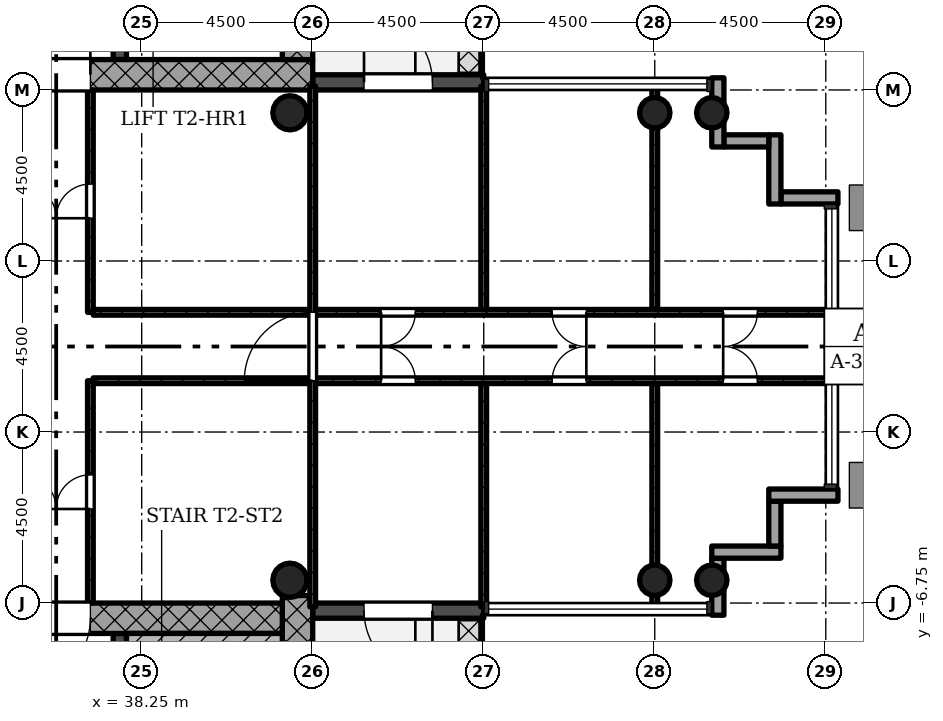
"""IFC4 building model, lengths in metres.
Left out: names, types, materials, properties, quantities, classifications, styles, units other than length and angle.
Written with IfcOpenShell. Run it as: python <this file> out.ifc"""

import sys

from ifc_helpers import new_model, si_unit, direction, frame, frame_2d, origin, origin_2d, place, context, subcontext, project, spatial, rectangle, hollow_circle, extrude, element, fill, save


model = new_model("IFC4")
c1 = context("Model", 3, precision=1e-05, world=origin(), true_north=direction((0.0, 1.0)))
c2 = subcontext(c1, "Body", "Model", "MODEL_VIEW")
j1 = project(units=[si_unit("LENGTHUNIT", "METRE"), si_unit("PLANEANGLEUNIT", "RADIAN")], contexts=[c1])
p1 = place(None, origin())
s1 = spatial("IfcSite", under=j1, at=p1, CompositionType="ELEMENT")
p2 = place(p1, origin())
s2 = spatial("IfcBuilding", under=s1, at=p2, CompositionType="ELEMENT")
p3 = place(p2, frame((0.0, 0.0, 128.7)))
s3 = spatial("IfcBuildingStorey", under=s2, at=p3, CompositionType="ELEMENT", Elevation=128.7)
p4 = place(p3, frame((30.05, 7.15, 0.0), z_axis=(0.0, 0.0, 1.0), x_axis=(1.0, 0.0, 0.0)))
e1 = element("IfcWall", 1, at=p4, inside=s3, PredefinedType="SHEAR", context=c2, shape_type="SweptSolid", body=[
    extrude(rectangle(XDim=12.7, YDim=0.8, at=frame_2d((6.35, 0.0))), origin(), (0.0, 0.0, 1.0), 5.0),
])
p5 = place(p4, frame((5.05, 0.0, 0.0)))
e2 = element("IfcOpeningElement", 2, at=p5, cuts=e1, PredefinedType="OPENING", context=c2, shape_type="SweptSolid", body=[
    extrude(rectangle(XDim=1.8, YDim=2.1, at=frame_2d((0.9, 1.05))), frame((0.0, 0.41, 0.0), z_axis=(0.0, -1.0, 0.0), x_axis=(1.0, 0.0, 0.0)), (0.0, 0.0, 1.0), 0.82),
])
p6 = place(p3, frame((42.35, 7.55, 0.0), z_axis=(0.0, 0.0, 1.0), x_axis=(0.0, 1.0, 0.0)))
e3 = element("IfcWall", 3, at=p6, inside=s3, PredefinedType="SHEAR", context=c2, shape_type="SweptSolid", body=[
    extrude(rectangle(XDim=8.2, YDim=0.8, at=frame_2d((4.1, 0.0))), origin(), (0.0, 0.0, 1.0), 5.0),
])
p7 = place(p3, frame((37.675, 7.55, 0.0), z_axis=(0.0, 0.0, 1.0), x_axis=(0.0, 1.0, 0.0)))
e4 = element("IfcWall", 4, at=p7, inside=s3, PredefinedType="SHEAR", context=c2, shape_type="SweptSolid", body=[
    extrude(rectangle(XDim=7.4, YDim=0.35, at=frame_2d((3.7, 0.0))), origin(), (0.0, 0.0, 1.0), 5.0),
])
p8 = place(p7, frame((0.95, 0.0, 0.0)))
e5 = element("IfcOpeningElement", 5, at=p8, cuts=e4, PredefinedType="OPENING", context=c2, shape_type="SweptSolid", body=[
    extrude(rectangle(XDim=1.1, YDim=2.1, at=frame_2d((0.55, 1.05))), frame((0.0, 0.185, 0.0), z_axis=(0.0, -1.0, 0.0), x_axis=(1.0, 0.0, 0.0)), (0.0, 0.0, 1.0), 0.37),
])
p9 = place(p7, frame((3.15, 0.0, 0.0)))
e6 = element("IfcOpeningElement", 6, at=p9, cuts=e4, PredefinedType="OPENING", context=c2, shape_type="SweptSolid", body=[
    extrude(rectangle(XDim=1.1, YDim=2.1, at=frame_2d((0.55, 1.05))), frame((0.0, 0.185, 0.0), z_axis=(0.0, -1.0, 0.0), x_axis=(1.0, 0.0, 0.0)), (0.0, 0.0, 1.0), 0.37),
])
p10 = place(p7, frame((5.35, 0.0, 0.0)))
e7 = element("IfcOpeningElement", 7, at=p10, cuts=e4, PredefinedType="OPENING", context=c2, shape_type="SweptSolid", body=[
    extrude(rectangle(XDim=1.1, YDim=2.1, at=frame_2d((0.55, 1.05))), frame((0.0, 0.185, 0.0), z_axis=(0.0, -1.0, 0.0), x_axis=(1.0, 0.0, 0.0)), (0.0, 0.0, 1.0), 0.37),
])
p11 = place(p3, frame((42.35, -14.95, 0.0), z_axis=(0.0, 0.0, 1.0), x_axis=(0.0, 1.0, 0.0)))
e8 = element("IfcWall", 8, at=p11, inside=s3, PredefinedType="SHEAR", context=c2, shape_type="SweptSolid", body=[
    extrude(rectangle(XDim=8.398, YDim=0.8, at=frame_2d((4.199, 0.0))), origin(), (0.0, 0.0, 1.0), 5.0),
])
p12 = place(p3, frame((41.95, -7.15, 0.0), z_axis=(0.0, 0.0, 1.0), x_axis=(-1.0, 0.0, 0.0)))
e9 = element("IfcWall", 9, at=p12, inside=s3, PredefinedType="SHEAR", context=c2, shape_type="SweptSolid", body=[
    extrude(rectangle(XDim=12.7, YDim=0.8, at=frame_2d((6.35, 0.0))), origin(), (0.0, 0.0, 1.0), 5.0),
])
p13 = place(p12, frame((5.05, 0.0, 0.0)))
e10 = element("IfcOpeningElement", 10, at=p13, cuts=e9, PredefinedType="OPENING", context=c2, shape_type="SweptSolid", body=[
    extrude(rectangle(XDim=1.8, YDim=2.1, at=frame_2d((0.9, 1.05))), frame((0.0, 0.41, 0.0), z_axis=(0.0, -1.0, 0.0), x_axis=(1.0, 0.0, 0.0)), (0.0, 0.0, 1.0), 0.82),
])
p14 = place(p3, frame((37.675, -14.95, 0.0), z_axis=(0.0, 0.0, 1.0), x_axis=(0.0, 1.0, 0.0)))
e11 = element("IfcWall", 11, at=p14, inside=s3, PredefinedType="SHEAR", context=c2, shape_type="SweptSolid", body=[
    extrude(rectangle(XDim=7.4, YDim=0.35, at=frame_2d((3.7, 0.0))), origin(), (0.0, 0.0, 1.0), 5.0),
])
p15 = place(p14, frame((5.65, 0.0, 0.0)))
e12 = element("IfcOpeningElement", 12, at=p15, cuts=e11, PredefinedType="OPENING", context=c2, shape_type="SweptSolid", body=[
    extrude(rectangle(XDim=0.9, YDim=2.1, at=frame_2d((0.45, 1.05))), frame((0.0, 0.185, 0.0), z_axis=(0.0, -1.0, 0.0), x_axis=(1.0, 0.0, 0.0)), (0.0, 0.0, 1.0), 0.37),
])
for number, where, z_axis, x_axis in (
    (13, (51.75, -6.15, 0.0), (0.0, 0.0, 1.0), (1.0, 0.0, 0.0)),
    (14, (51.75, 6.15, 0.0), (0.0, 0.0, 1.0), (1.0, 0.0, 0.0)),
    (15, (53.25, -6.15, 0.0), (0.0, 0.0, 1.0), (1.0, 0.0, 0.0)),
    (16, (53.25, 6.15, 0.0), (0.0, 0.0, 1.0), (1.0, 0.0, 0.0)),
):
    element("IfcColumn", number, at=place(p3, frame(where, z_axis=z_axis, x_axis=x_axis)), inside=s3, PredefinedType="COLUMN", context=c2, shape_type="SweptSolid", body=[
        extrude(hollow_circle(Radius=0.4, WallThickness=0.028, at=origin_2d()), origin(), (0.0, 0.0, 1.0), 5.0),
    ])
for number, where, z_axis, x_axis in (
    (17, (42.15, -6.15, 0.0), (0.0, 0.0, 1.0), (1.0, 0.0, 0.0)),
    (18, (42.15, 6.15, 0.0), (0.0, 0.0, 1.0), (1.0, 0.0, 0.0)),
):
    element("IfcColumn", number, at=place(p3, frame(where, z_axis=z_axis, x_axis=x_axis)), inside=s3, PredefinedType="COLUMN", context=c2, shape_type="SweptSolid", body=[
        extrude(hollow_circle(Radius=0.45, WallThickness=0.032, at=origin_2d()), origin(), (0.0, 0.0, 1.0), 5.0),
    ])
p16 = place(p3, frame((42.75, -6.95, -0.02), z_axis=(0.0, 0.0, 1.0), x_axis=(1.0, 0.0, 0.0)))
e19 = element("IfcWall", 19, at=p16, inside=s3, PredefinedType="STANDARD", context=c2, shape_type="SweptSolid", body=[
    extrude(rectangle(XDim=4.5, YDim=0.4, at=frame_2d((2.25, 0.0))), origin(), (0.0, 0.0, 1.0), 4.72),
])
p17 = place(p16, frame((1.35, 0.0, 0.02)))
e20 = element("IfcOpeningElement", 20, at=p17, cuts=e19, PredefinedType="OPENING", context=c2, shape_type="SweptSolid", body=[
    extrude(rectangle(XDim=1.8, YDim=2.1, at=frame_2d((0.9, 1.05))), frame((0.0, 0.21, 0.0), z_axis=(0.0, -1.0, 0.0), x_axis=(1.0, 0.0, 0.0)), (0.0, 0.0, 1.0), 0.42),
])
p18 = place(p3, frame((53.41, -7.07, -0.3), z_axis=(0.0, 0.0, 1.0), x_axis=(0.0, 1.0, 0.0)))
e21 = element("IfcWall", 21, at=p18, inside=s3, PredefinedType="STANDARD", context=c2, shape_type="SweptSolid", body=[
    extrude(rectangle(XDim=1.5, YDim=0.32, at=frame_2d((0.75, 0.0))), origin(), (0.0, 0.0, 1.0), 5.0),
])
p19 = place(p3, frame((53.25, -5.41, -0.3), z_axis=(0.0, 0.0, 1.0), x_axis=(1.0, 0.0, 0.0)))
e22 = element("IfcWall", 22, at=p19, inside=s3, PredefinedType="STANDARD", context=c2, shape_type="SweptSolid", body=[
    extrude(rectangle(XDim=1.82, YDim=0.32, at=frame_2d((0.91, 0.0))), origin(), (0.0, 0.0, 1.0), 5.0),
])
p20 = place(p3, frame((54.91, -5.25, -0.3), z_axis=(0.0, 0.0, 1.0), x_axis=(0.0, 1.0, 0.0)))
e23 = element("IfcWall", 23, at=p20, inside=s3, PredefinedType="STANDARD", context=c2, shape_type="SweptSolid", body=[
    extrude(rectangle(XDim=1.18, YDim=0.32, at=frame_2d((0.59, 0.0))), origin(), (0.0, 0.0, 1.0), 5.0),
])
p21 = place(p3, frame((54.75, -3.91, -0.3), z_axis=(0.0, 0.0, 1.0), x_axis=(1.0, 0.0, 0.0)))
e24 = element("IfcWall", 24, at=p21, inside=s3, PredefinedType="STANDARD", context=c2, shape_type="SweptSolid", body=[
    extrude(rectangle(XDim=1.82, YDim=0.32, at=frame_2d((0.91, 0.0))), origin(), (0.0, 0.0, 1.0), 5.0),
])
p22 = place(p3, frame((56.57, 3.91, -0.3), z_axis=(0.0, 0.0, 1.0), x_axis=(-1.0, 0.0, 0.0)))
e25 = element("IfcWall", 25, at=p22, inside=s3, PredefinedType="STANDARD", context=c2, shape_type="SweptSolid", body=[
    extrude(rectangle(XDim=1.5, YDim=0.32, at=frame_2d((0.75, 0.0))), origin(), (0.0, 0.0, 1.0), 5.0),
])
p23 = place(p3, frame((54.91, 3.75, -0.3), z_axis=(0.0, 0.0, 1.0), x_axis=(0.0, 1.0, 0.0)))
e26 = element("IfcWall", 26, at=p23, inside=s3, PredefinedType="STANDARD", context=c2, shape_type="SweptSolid", body=[
    extrude(rectangle(XDim=1.82, YDim=0.32, at=frame_2d((0.91, 0.0))), origin(), (0.0, 0.0, 1.0), 5.0),
])
p24 = place(p3, frame((54.75, 5.41, -0.3), z_axis=(0.0, 0.0, 1.0), x_axis=(-1.0, 0.0, 0.0)))
e27 = element("IfcWall", 27, at=p24, inside=s3, PredefinedType="STANDARD", context=c2, shape_type="SweptSolid", body=[
    extrude(rectangle(XDim=1.18, YDim=0.32, at=frame_2d((0.59, 0.0))), origin(), (0.0, 0.0, 1.0), 5.0),
])
p25 = place(p3, frame((53.41, 5.25, -0.3), z_axis=(0.0, 0.0, 1.0), x_axis=(0.0, 1.0, 0.0)))
e28 = element("IfcWall", 28, at=p25, inside=s3, PredefinedType="STANDARD", context=c2, shape_type="SweptSolid", body=[
    extrude(rectangle(XDim=1.82, YDim=0.32, at=frame_2d((0.91, 0.0))), origin(), (0.0, 0.0, 1.0), 5.0),
])
p26 = place(p3, frame((47.25, 6.95, -0.02), z_axis=(0.0, 0.0, 1.0), x_axis=(-1.0, 0.0, 0.0)))
e29 = element("IfcWall", 29, at=p26, inside=s3, PredefinedType="STANDARD", context=c2, shape_type="SweptSolid", body=[
    extrude(rectangle(XDim=4.5, YDim=0.4, at=frame_2d((2.25, 0.0))), origin(), (0.0, 0.0, 1.0), 4.72),
])
p27 = place(p26, frame((1.35, 0.0, 0.02)))
e30 = element("IfcOpeningElement", 30, at=p27, cuts=e29, PredefinedType="OPENING", context=c2, shape_type="SweptSolid", body=[
    extrude(rectangle(XDim=1.8, YDim=2.1, at=frame_2d((0.9, 1.05))), frame((0.0, 0.21, 0.0), z_axis=(0.0, -1.0, 0.0), x_axis=(1.0, 0.0, 0.0)), (0.0, 0.0, 1.0), 0.42),
])
p28 = place(p3, frame((36.9, 0.9, 0.0), z_axis=(0.0, 0.0, 1.0), x_axis=(0.0, 1.0, 0.0)))
e31 = element("IfcWall", 31, at=p28, inside=s3, PredefinedType="PARTITIONING", context=c2, shape_type="SweptSolid", body=[
    extrude(rectangle(XDim=5.85, YDim=0.15, at=frame_2d((2.925, 0.0))), origin(), (0.0, 0.0, 1.0), 4.58),
])
p29 = place(p28, frame((2.475, 0.0, 0.0)))
e32 = element("IfcOpeningElement", 32, at=p29, cuts=e31, PredefinedType="OPENING", context=c2, shape_type="SweptSolid", body=[
    extrude(rectangle(XDim=0.9, YDim=2.1, at=frame_2d((0.45, 1.05))), frame((0.0, 0.085, 0.0), z_axis=(0.0, -1.0, 0.0), x_axis=(1.0, 0.0, 0.0)), (0.0, 0.0, 1.0), 0.17),
])
p30 = place(p3, frame((42.675, 0.9, 0.0), z_axis=(0.0, 0.0, 1.0), x_axis=(-1.0, 0.0, 0.0)))
e33 = element("IfcWall", 33, at=p30, inside=s3, PredefinedType="PARTITIONING", context=c2, shape_type="SweptSolid", body=[
    extrude(rectangle(XDim=5.7, YDim=0.15, at=frame_2d((2.85, 0.0))), origin(), (0.0, 0.0, 1.0), 4.58),
])
p31 = place(p3, frame((36.9, -6.75, 0.0), z_axis=(0.0, 0.0, 1.0), x_axis=(0.0, 1.0, 0.0)))
e34 = element("IfcWall", 34, at=p31, inside=s3, PredefinedType="PARTITIONING", context=c2, shape_type="SweptSolid", body=[
    extrude(rectangle(XDim=5.85, YDim=0.15, at=frame_2d((2.925, 0.0))), origin(), (0.0, 0.0, 1.0), 4.58),
])
p32 = place(p31, frame((2.475, 0.0, 0.0)))
e35 = element("IfcOpeningElement", 35, at=p32, cuts=e34, PredefinedType="OPENING", context=c2, shape_type="SweptSolid", body=[
    extrude(rectangle(XDim=0.9, YDim=2.1, at=frame_2d((0.45, 1.05))), frame((0.0, 0.085, 0.0), z_axis=(0.0, -1.0, 0.0), x_axis=(1.0, 0.0, 0.0)), (0.0, 0.0, 1.0), 0.17),
])
p33 = place(p3, frame((42.675, -0.9, 0.0), z_axis=(0.0, 0.0, 1.0), x_axis=(-1.0, 0.0, 0.0)))
e36 = element("IfcWall", 36, at=p33, inside=s3, PredefinedType="PARTITIONING", context=c2, shape_type="SweptSolid", body=[
    extrude(rectangle(XDim=5.7, YDim=0.15, at=frame_2d((2.85, 0.0))), origin(), (0.0, 0.0, 1.0), 4.58),
])
p34 = place(p3, frame((42.75, -6.85, 0.0), z_axis=(0.0, 0.0, 1.0), x_axis=(0.0, 1.0, 0.0)))
e37 = element("IfcWall", 37, at=p34, inside=s3, PredefinedType="PARTITIONING", context=c2, shape_type="SweptSolid", body=[
    extrude(rectangle(XDim=13.7, YDim=0.15, at=frame_2d((6.85, 0.0))), origin(), (0.0, 0.0, 1.0), 4.58),
])
p35 = place(p34, frame((5.95, 0.0, 0.0)))
e38 = element("IfcOpeningElement", 38, at=p35, cuts=e37, PredefinedType="OPENING", context=c2, shape_type="SweptSolid", body=[
    extrude(rectangle(XDim=1.8, YDim=2.1, at=frame_2d((0.9, 1.05))), frame((0.0, 0.085, 0.0), z_axis=(0.0, -1.0, 0.0), x_axis=(1.0, 0.0, 0.0)), (0.0, 0.0, 1.0), 0.17),
])
p36 = place(p3, frame((56.35, 0.9, 0.0), z_axis=(0.0, 0.0, 1.0), x_axis=(-1.0, 0.0, 0.0)))
e39 = element("IfcWall", 39, at=p36, inside=s3, PredefinedType="PARTITIONING", context=c2, shape_type="SweptSolid", body=[
    extrude(rectangle(XDim=13.525, YDim=0.15, at=frame_2d((6.763, 0.0))), origin(), (0.0, 0.0, 1.0), 4.58),
])
p37 = place(p36, frame((1.9, 0.0, 0.0)))
e40 = element("IfcOpeningElement", 40, at=p37, cuts=e39, PredefinedType="OPENING", context=c2, shape_type="SweptSolid", body=[
    extrude(rectangle(XDim=0.9, YDim=2.1, at=frame_2d((0.45, 1.05))), frame((0.0, 0.085, 0.0), z_axis=(0.0, -1.0, 0.0), x_axis=(1.0, 0.0, 0.0)), (0.0, 0.0, 1.0), 0.17),
])
p38 = place(p36, frame((6.4, 0.0, 0.0)))
e41 = element("IfcOpeningElement", 41, at=p38, cuts=e39, PredefinedType="OPENING", context=c2, shape_type="SweptSolid", body=[
    extrude(rectangle(XDim=0.9, YDim=2.1, at=frame_2d((0.45, 1.05))), frame((0.0, 0.085, 0.0), z_axis=(0.0, -1.0, 0.0), x_axis=(1.0, 0.0, 0.0)), (0.0, 0.0, 1.0), 0.17),
])
p39 = place(p36, frame((10.9, 0.0, 0.0)))
e42 = element("IfcOpeningElement", 42, at=p39, cuts=e39, PredefinedType="OPENING", context=c2, shape_type="SweptSolid", body=[
    extrude(rectangle(XDim=0.9, YDim=2.1, at=frame_2d((0.45, 1.05))), frame((0.0, 0.085, 0.0), z_axis=(0.0, -1.0, 0.0), x_axis=(1.0, 0.0, 0.0)), (0.0, 0.0, 1.0), 0.17),
])
for number, where, z_axis, x_axis in (
    (43, (51.75, 0.975, 0.0), (0.0, 0.0, 1.0), (0.0, 1.0, 0.0)),
    (44, (47.25, 0.975, 0.0), (0.0, 0.0, 1.0), (0.0, 1.0, 0.0)),
):
    element("IfcWall", number, at=place(p3, frame(where, z_axis=z_axis, x_axis=x_axis)), inside=s3, PredefinedType="PARTITIONING", context=c2, shape_type="SweptSolid", body=[
        extrude(rectangle(XDim=5.875, YDim=0.15, at=frame_2d((2.938, 0.0))), origin(), (0.0, 0.0, 1.0), 4.58),
    ])
p40 = place(p3, frame((56.35, -0.9, 0.0), z_axis=(0.0, 0.0, 1.0), x_axis=(-1.0, 0.0, 0.0)))
e45 = element("IfcWall", 45, at=p40, inside=s3, PredefinedType="PARTITIONING", context=c2, shape_type="SweptSolid", body=[
    extrude(rectangle(XDim=13.525, YDim=0.15, at=frame_2d((6.763, 0.0))), origin(), (0.0, 0.0, 1.0), 4.58),
])
p41 = place(p40, frame((1.9, 0.0, 0.0)))
e46 = element("IfcOpeningElement", 46, at=p41, cuts=e45, PredefinedType="OPENING", context=c2, shape_type="SweptSolid", body=[
    extrude(rectangle(XDim=0.9, YDim=2.1, at=frame_2d((0.45, 1.05))), frame((0.0, 0.085, 0.0), z_axis=(0.0, -1.0, 0.0), x_axis=(1.0, 0.0, 0.0)), (0.0, 0.0, 1.0), 0.17),
])
p42 = place(p40, frame((6.4, 0.0, 0.0)))
e47 = element("IfcOpeningElement", 47, at=p42, cuts=e45, PredefinedType="OPENING", context=c2, shape_type="SweptSolid", body=[
    extrude(rectangle(XDim=0.9, YDim=2.1, at=frame_2d((0.45, 1.05))), frame((0.0, 0.085, 0.0), z_axis=(0.0, -1.0, 0.0), x_axis=(1.0, 0.0, 0.0)), (0.0, 0.0, 1.0), 0.17),
])
p43 = place(p40, frame((10.9, 0.0, 0.0)))
e48 = element("IfcOpeningElement", 48, at=p43, cuts=e45, PredefinedType="OPENING", context=c2, shape_type="SweptSolid", body=[
    extrude(rectangle(XDim=0.9, YDim=2.1, at=frame_2d((0.45, 1.05))), frame((0.0, 0.085, 0.0), z_axis=(0.0, -1.0, 0.0), x_axis=(1.0, 0.0, 0.0)), (0.0, 0.0, 1.0), 0.17),
])
for number, where, z_axis, x_axis in (
    (49, (51.75, -0.975, 0.0), (0.0, 0.0, 1.0), (0.0, -1.0, 0.0)),
    (50, (47.25, -0.975, 0.0), (0.0, 0.0, 1.0), (0.0, -1.0, 0.0)),
):
    element("IfcWall", number, at=place(p3, frame(where, z_axis=z_axis, x_axis=x_axis)), inside=s3, PredefinedType="PARTITIONING", context=c2, shape_type="SweptSolid", body=[
        extrude(rectangle(XDim=5.875, YDim=0.15, at=frame_2d((2.938, 0.0))), origin(), (0.0, 0.0, 1.0), 4.58),
    ])
p44 = place(p3, frame((37.85, -7.75, 0.0), z_axis=(0.0, 0.0, 1.0), x_axis=(1.0, 0.0, 0.0)))
e51 = element("IfcWall", 51, at=p44, inside=s3, PredefinedType="SHEAR", context=c2, shape_type="SweptSolid", body=[
    extrude(rectangle(XDim=4.1, YDim=0.4, at=frame_2d((2.05, 0.0))), origin(), (0.0, 0.0, 1.0), 5.0),
])
p45 = place(p17, origin())
e52 = element("IfcDoor", 52, at=p45, inside=s3, OperationType="SINGLE_SWING_RIGHT", PredefinedType="DOOR", context=c2, shape_type="SweptSolid", body=[
    extrude(rectangle(XDim=1.8, YDim=2.1, at=frame_2d((0.9, 1.05))), frame((0.0, 0.025, 0.0), z_axis=(0.0, -1.0, 0.0), x_axis=(1.0, 0.0, 0.0)), (0.0, 0.0, 1.0), 0.05),
])
fill(e20, e52)
p46 = place(p27, origin())
e53 = element("IfcDoor", 53, at=p46, inside=s3, OperationType="SINGLE_SWING_RIGHT", PredefinedType="DOOR", context=c2, shape_type="SweptSolid", body=[
    extrude(rectangle(XDim=1.8, YDim=2.1, at=frame_2d((0.9, 1.05))), frame((0.0, 0.025, 0.0), z_axis=(0.0, -1.0, 0.0), x_axis=(1.0, 0.0, 0.0)), (0.0, 0.0, 1.0), 0.05),
])
fill(e30, e53)
p47 = place(p29, origin())
e54 = element("IfcDoor", 54, at=p47, inside=s3, OperationType="SINGLE_SWING_RIGHT", PredefinedType="DOOR", context=c2, shape_type="SweptSolid", body=[
    extrude(rectangle(XDim=0.9, YDim=2.1, at=frame_2d((0.45, 1.05))), frame((0.0, 0.025, 0.0), z_axis=(0.0, -1.0, 0.0), x_axis=(1.0, 0.0, 0.0)), (0.0, 0.0, 1.0), 0.05),
])
fill(e32, e54)
p48 = place(p32, origin())
e55 = element("IfcDoor", 55, at=p48, inside=s3, OperationType="SINGLE_SWING_RIGHT", PredefinedType="DOOR", context=c2, shape_type="SweptSolid", body=[
    extrude(rectangle(XDim=0.9, YDim=2.1, at=frame_2d((0.45, 1.05))), frame((0.0, 0.025, 0.0), z_axis=(0.0, -1.0, 0.0), x_axis=(1.0, 0.0, 0.0)), (0.0, 0.0, 1.0), 0.05),
])
fill(e35, e55)
p49 = place(p35, origin())
e56 = element("IfcDoor", 56, at=p49, inside=s3, OperationType="SINGLE_SWING_RIGHT", PredefinedType="DOOR", context=c2, shape_type="SweptSolid", body=[
    extrude(rectangle(XDim=1.8, YDim=2.1, at=frame_2d((0.9, 1.05))), frame((0.0, 0.025, 0.0), z_axis=(0.0, -1.0, 0.0), x_axis=(1.0, 0.0, 0.0)), (0.0, 0.0, 1.0), 0.05),
])
fill(e38, e56)
p50 = place(p37, origin())
e57 = element("IfcDoor", 57, at=p50, inside=s3, OperationType="SINGLE_SWING_LEFT", PredefinedType="DOOR", context=c2, shape_type="SweptSolid", body=[
    extrude(rectangle(XDim=0.9, YDim=2.1, at=frame_2d((0.45, 1.05))), frame((0.0, 0.025, 0.0), z_axis=(0.0, -1.0, 0.0), x_axis=(1.0, 0.0, 0.0)), (0.0, 0.0, 1.0), 0.05),
])
fill(e40, e57)
p51 = place(p38, origin())
e58 = element("IfcDoor", 58, at=p51, inside=s3, OperationType="SINGLE_SWING_RIGHT", PredefinedType="DOOR", context=c2, shape_type="SweptSolid", body=[
    extrude(rectangle(XDim=0.9, YDim=2.1, at=frame_2d((0.45, 1.05))), frame((0.0, 0.025, 0.0), z_axis=(0.0, -1.0, 0.0), x_axis=(1.0, 0.0, 0.0)), (0.0, 0.0, 1.0), 0.05),
])
fill(e41, e58)
p52 = place(p39, origin())
e59 = element("IfcDoor", 59, at=p52, inside=s3, OperationType="SINGLE_SWING_LEFT", PredefinedType="DOOR", context=c2, shape_type="SweptSolid", body=[
    extrude(rectangle(XDim=0.9, YDim=2.1, at=frame_2d((0.45, 1.05))), frame((0.0, 0.025, 0.0), z_axis=(0.0, -1.0, 0.0), x_axis=(1.0, 0.0, 0.0)), (0.0, 0.0, 1.0), 0.05),
])
fill(e42, e59)
p53 = place(p41, origin())
e60 = element("IfcDoor", 60, at=p53, inside=s3, OperationType="SINGLE_SWING_RIGHT", PredefinedType="DOOR", context=c2, shape_type="SweptSolid", body=[
    extrude(rectangle(XDim=0.9, YDim=2.1, at=frame_2d((0.45, 1.05))), frame((0.0, 0.025, 0.0), z_axis=(0.0, -1.0, 0.0), x_axis=(1.0, 0.0, 0.0)), (0.0, 0.0, 1.0), 0.05),
])
fill(e46, e60)
p54 = place(p42, origin())
e61 = element("IfcDoor", 61, at=p54, inside=s3, OperationType="SINGLE_SWING_LEFT", PredefinedType="DOOR", context=c2, shape_type="SweptSolid", body=[
    extrude(rectangle(XDim=0.9, YDim=2.1, at=frame_2d((0.45, 1.05))), frame((0.0, 0.025, 0.0), z_axis=(0.0, -1.0, 0.0), x_axis=(1.0, 0.0, 0.0)), (0.0, 0.0, 1.0), 0.05),
])
fill(e47, e61)
p55 = place(p43, origin())
e62 = element("IfcDoor", 62, at=p55, inside=s3, OperationType="SINGLE_SWING_RIGHT", PredefinedType="DOOR", context=c2, shape_type="SweptSolid", body=[
    extrude(rectangle(XDim=0.9, YDim=2.1, at=frame_2d((0.45, 1.05))), frame((0.0, 0.025, 0.0), z_axis=(0.0, -1.0, 0.0), x_axis=(1.0, 0.0, 0.0)), (0.0, 0.0, 1.0), 0.05),
])
fill(e48, e62)
p56 = place(p5, origin())
e63 = element("IfcDoor", 63, at=p56, inside=s3, OperationType="SINGLE_SWING_LEFT", PredefinedType="DOOR", context=c2, shape_type="SweptSolid", body=[
    extrude(rectangle(XDim=1.8, YDim=2.1, at=frame_2d((0.9, 1.05))), frame((0.0, 0.025, 0.0), z_axis=(0.0, -1.0, 0.0), x_axis=(1.0, 0.0, 0.0)), (0.0, 0.0, 1.0), 0.05),
])
fill(e2, e63)
p57 = place(p13, origin())
e64 = element("IfcDoor", 64, at=p57, inside=s3, OperationType="SINGLE_SWING_LEFT", PredefinedType="DOOR", context=c2, shape_type="SweptSolid", body=[
    extrude(rectangle(XDim=1.8, YDim=2.1, at=frame_2d((0.9, 1.05))), frame((0.0, 0.025, 0.0), z_axis=(0.0, -1.0, 0.0), x_axis=(1.0, 0.0, 0.0)), (0.0, 0.0, 1.0), 0.05),
])
fill(e10, e64)
save(model, sys.argv[1])
